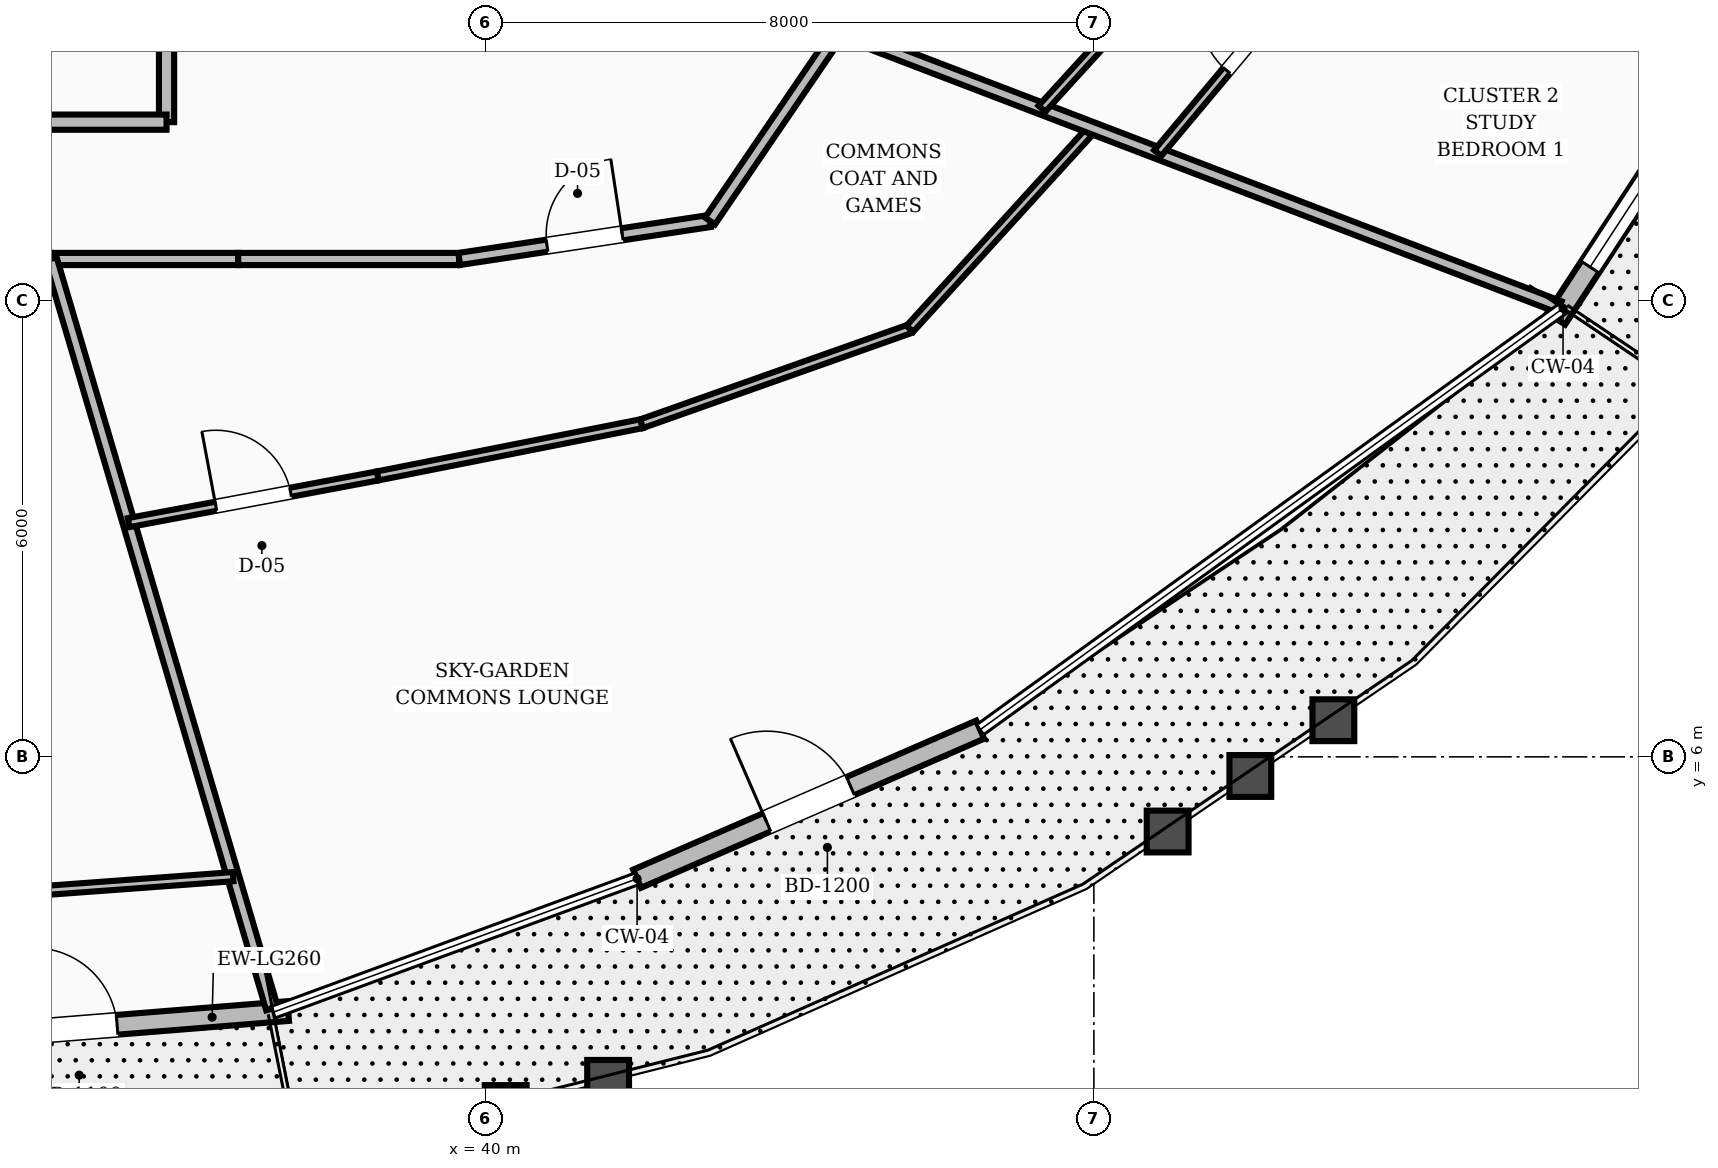
"""IFC4 building model, lengths in metres.
Left out: names, types, materials, properties, quantities, classifications, styles, units other than length and angle.
Written with IfcOpenShell. Run it as: python <this file> out.ifc"""

import sys

from ifc_helpers import new_model, si_unit, direction, frame, frame_2d, origin, place, context, subcontext, project, spatial, rectangle, extrude, element, fill, save


model = new_model("IFC4")
c1 = context("Model", 3, precision=1e-05, world=origin(), true_north=direction((0.0, 1.0)))
c2 = subcontext(c1, "Body", "Model", "MODEL_VIEW")
j1 = project(units=[si_unit("LENGTHUNIT", "METRE"), si_unit("PLANEANGLEUNIT", "RADIAN")], contexts=[c1])
p1 = place(None, origin())
s1 = spatial("IfcSite", under=j1, at=p1, CompositionType="ELEMENT")
p2 = place(p1, origin())
s2 = spatial("IfcBuilding", under=s1, at=p2, CompositionType="ELEMENT")
p3 = place(p2, frame((0.0, 0.0, 124.4)))
s3 = spatial("IfcBuildingStorey", under=s2, at=p3, CompositionType="ELEMENT", Elevation=124.4)
p4 = place(p3, frame((32.0, 2.221, 0.0), z_axis=(0.0, 0.0, 1.0), x_axis=(0.996781807787, 0.080162507846, 0.0)))
e1 = element("IfcWall", 1, at=p4, inside=s3, PredefinedType="STANDARD", context=c2, shape_type="SweptSolid", body=[
    extrude(rectangle(XDim=5.418, YDim=0.26, at=frame_2d((2.709, 0.0))), origin(), (0.0, 0.0, 1.0), 2.82),
])
p5 = place(p4, frame((2.06, 0.0, 0.0)))
e2 = element("IfcOpeningElement", 2, at=p5, cuts=e1, PredefinedType="OPENING", context=c2, shape_type="SweptSolid", body=[
    extrude(rectangle(XDim=1.1, YDim=2.15, at=frame_2d((0.55, 1.075))), frame((0.0, 0.14, 0.0), z_axis=(0.0, -1.0, 0.0), x_axis=(1.0, 0.0, 0.0)), (0.0, 0.0, 1.0), 0.28),
])
p6 = place(p3, frame((41.99, 4.396, 0.0), z_axis=(0.0, 0.0, 1.0), x_axis=(0.917175715583, 0.398483006846, 0.0)))
e3 = element("IfcWall", 3, at=p6, inside=s3, PredefinedType="STANDARD", context=c2, shape_type="SweptSolid", body=[
    extrude(rectangle(XDim=4.921, YDim=0.26, at=frame_2d((2.46, 0.0))), origin(), (0.0, 0.0, 1.0), 2.82),
])
p7 = place(p6, frame((1.861, 0.0, 0.0)))
e4 = element("IfcOpeningElement", 4, at=p7, cuts=e3, PredefinedType="OPENING", context=c2, shape_type="SweptSolid", body=[
    extrude(rectangle(XDim=1.2, YDim=2.15, at=frame_2d((0.6, 1.075))), frame((0.0, 0.14, 0.0), z_axis=(0.0, -1.0, 0.0), x_axis=(1.0, 0.0, 0.0)), (0.0, 0.0, 1.0), 0.28),
])
p8 = place(p3, frame((54.083, 11.763, 0.0), z_axis=(0.0, 0.0, 1.0), x_axis=(0.54762586096, 0.8367233213, 0.0)))
e5 = element("IfcWall", 5, at=p8, inside=s3, PredefinedType="STANDARD", context=c2, shape_type="SweptSolid", body=[
    extrude(rectangle(XDim=4.664, YDim=0.28, at=frame_2d((2.332, 0.0))), origin(), (0.0, 0.0, 1.0), 2.82),
])
p9 = place(p8, frame((0.814, 0.0, 0.8)))
e6 = element("IfcOpeningElement", 6, at=p9, cuts=e5, PredefinedType="OPENING", context=c2, shape_type="SweptSolid", body=[
    extrude(rectangle(XDim=3.2, YDim=1.65, at=frame_2d((1.6, 0.825))), frame((0.0, 0.15, 0.0), z_axis=(0.0, -1.0, 0.0), x_axis=(1.0, 0.0, 0.0)), (0.0, 0.0, 1.0), 0.3),
])
p10 = place(p3, frame((35.8, 14.35, 0.0), z_axis=(0.0, 0.0, 1.0), x_axis=(0.0, 1.0, 0.0)))
e7 = element("IfcWall", 7, at=p10, inside=s3, PredefinedType="SOLIDWALL", context=c2, shape_type="SweptSolid", body=[
    extrude(rectangle(XDim=2.2, YDim=0.2, at=frame_2d((1.1, 0.0))), origin(), (0.0, 0.0, 1.0), 2.8),
])
p11 = place(p3, frame((28.2, 14.35, 0.0), z_axis=(0.0, 0.0, 1.0), x_axis=(1.0, 0.0, 0.0)))
e8 = element("IfcWall", 8, at=p11, inside=s3, PredefinedType="SOLIDWALL", context=c2, shape_type="SweptSolid", body=[
    extrude(rectangle(XDim=7.6, YDim=0.2, at=frame_2d((3.8, 0.0))), origin(), (0.0, 0.0, 1.0), 2.8),
])
p12 = place(p11, frame((3.2, 0.0, 0.0)))
e9 = element("IfcOpeningElement", 9, at=p12, cuts=e8, PredefinedType="OPENING", context=c2, shape_type="SweptSolid", body=[
    extrude(rectangle(XDim=1.2, YDim=2.1, at=frame_2d((0.6, 1.05))), frame((0.0, 0.11, 0.0), z_axis=(0.0, -1.0, 0.0), x_axis=(1.0, 0.0, 0.0)), (0.0, 0.0, 1.0), 0.22),
])
p13 = place(p3, frame((34.278, 12.55, 0.0), z_axis=(0.0, 0.0, 1.0), x_axis=(1.0, 0.0, 0.0)))
e10 = element("IfcWall", 10, at=p13, inside=s3, PredefinedType="SOLIDWALL", context=c2, shape_type="SweptSolid", body=[
    extrude(rectangle(XDim=2.465, YDim=0.16, at=frame_2d((1.232, 0.0))), origin(), (0.0, 0.0, 1.0), 2.8),
])
p14 = place(p3, frame((36.743, 12.55, 0.0), z_axis=(0.0, 0.0, 1.0), x_axis=(1.0, 0.0, 0.0)))
e11 = element("IfcWall", 11, at=p14, inside=s3, PredefinedType="SOLIDWALL", context=c2, shape_type="SweptSolid", body=[
    extrude(rectangle(XDim=2.908, YDim=0.16, at=frame_2d((1.454, 0.0))), origin(), (0.0, 0.0, 1.0), 2.8),
])
p15 = place(p3, frame((39.651, 12.55, 0.0), z_axis=(0.0, 0.0, 1.0), x_axis=(0.988710906508, 0.149835721217, 0.0)))
e12 = element("IfcWall", 12, at=p15, inside=s3, PredefinedType="SOLIDWALL", context=c2, shape_type="SweptSolid", body=[
    extrude(rectangle(XDim=3.337, YDim=0.16, at=frame_2d((1.668, 0.0))), origin(), (0.0, 0.0, 1.0), 2.8),
])
p16 = place(p15, frame((1.168, 0.0, 0.0)))
e13 = element("IfcOpeningElement", 13, at=p16, cuts=e12, PredefinedType="OPENING", context=c2, shape_type="SweptSolid", body=[
    extrude(rectangle(XDim=1.0, YDim=2.1, at=frame_2d((0.5, 1.05))), frame((0.0, 0.09, 0.0), z_axis=(0.0, -1.0, 0.0), x_axis=(1.0, 0.0, 0.0)), (0.0, 0.0, 1.0), 0.18),
])
p17 = place(p3, frame((42.95, 13.05, 0.0), z_axis=(0.0, 0.0, 1.0), x_axis=(0.562674669208, 0.826678423955, 0.0)))
e14 = element("IfcWall", 14, at=p17, inside=s3, PredefinedType="SOLIDWALL", context=c2, shape_type="SweptSolid", body=[
    extrude(rectangle(XDim=3.021, YDim=0.16, at=frame_2d((1.511, 0.0))), origin(), (0.0, 0.0, 1.0), 2.8),
])
p18 = place(p3, frame((34.278, 12.55, 0.0), z_axis=(0.0, 0.0, 1.0), x_axis=(0.283064731291, -0.959100806954, 0.0)))
e15 = element("IfcWall", 15, at=p18, inside=s3, PredefinedType="SOLIDWALL", context=c2, shape_type="SweptSolid", body=[
    extrude(rectangle(XDim=10.283, YDim=0.16, at=frame_2d((5.141, 0.0))), origin(), (0.0, 0.0, 1.0), 2.8),
])
p19 = place(p3, frame((35.301, 9.082, 0.0), z_axis=(0.0, 0.0, 1.0), x_axis=(0.982868872263, 0.184306212419, 0.0)))
e16 = element("IfcWall", 16, at=p19, inside=s3, PredefinedType="PARTITIONING", context=c2, shape_type="SweptSolid", body=[
    extrude(rectangle(XDim=3.335, YDim=0.12, at=frame_2d((1.668, 0.0))), origin(), (0.0, 0.0, 1.0), 2.8),
])
p20 = place(p19, frame((1.168, 0.0, 0.0)))
e17 = element("IfcOpeningElement", 17, at=p20, cuts=e16, PredefinedType="OPENING", context=c2, shape_type="SweptSolid", body=[
    extrude(rectangle(XDim=1.0, YDim=2.1, at=frame_2d((0.5, 1.05))), frame((0.0, 0.07, 0.0), z_axis=(0.0, -1.0, 0.0), x_axis=(1.0, 0.0, 0.0)), (0.0, 0.0, 1.0), 0.14),
])
p21 = place(p3, frame((38.58, 9.696, 0.0), z_axis=(0.0, 0.0, 1.0), x_axis=(0.980995270945, 0.19403164274, 0.0)))
e18 = element("IfcWall", 18, at=p21, inside=s3, PredefinedType="PARTITIONING", context=c2, shape_type="SweptSolid", body=[
    extrude(rectangle(XDim=3.537, YDim=0.12, at=frame_2d((1.769, 0.0))), origin(), (0.0, 0.0, 1.0), 2.8),
])
p22 = place(p3, frame((42.049, 10.383, 0.0), z_axis=(0.0, 0.0, 1.0), x_axis=(0.942746880335, 0.333509099753, 0.0)))
e19 = element("IfcWall", 19, at=p22, inside=s3, PredefinedType="PARTITIONING", context=c2, shape_type="SweptSolid", body=[
    extrude(rectangle(XDim=3.744, YDim=0.12, at=frame_2d((1.872, 0.0))), origin(), (0.0, 0.0, 1.0), 2.8),
])
p23 = place(p3, frame((45.579, 11.631, 0.0), z_axis=(0.0, 0.0, 1.0), x_axis=(0.673346353961, 0.739327185762, 0.0)))
e20 = element("IfcWall", 20, at=p23, inside=s3, PredefinedType="PARTITIONING", context=c2, shape_type="SweptSolid", body=[
    extrude(rectangle(XDim=3.571, YDim=0.12, at=frame_2d((1.785, 0.0))), origin(), (0.0, 0.0, 1.0), 2.8),
])
p24 = place(p3, frame((44.65, 15.548, 0.0), z_axis=(0.0, 0.0, 1.0), x_axis=(0.933853161124, -0.35765664185, 0.0)))
e21 = element("IfcWall", 21, at=p24, inside=s3, PredefinedType="SOLIDWALL", context=c2, shape_type="SweptSolid", body=[
    extrude(rectangle(XDim=10.147, YDim=0.16, at=frame_2d((5.073, 0.0))), origin(), (0.0, 0.0, 1.0), 2.8),
])
p25 = place(p3, frame((47.316, 14.526, 0.0), z_axis=(0.0, 0.0, 1.0), x_axis=(0.673803025367, 0.738911011562, 0.0)))
e22 = element("IfcWall", 22, at=p25, inside=s3, PredefinedType="PARTITIONING", context=c2, shape_type="SweptSolid", body=[
    extrude(rectangle(XDim=3.589, YDim=0.12, at=frame_2d((1.794, 0.0))), origin(), (0.0, 0.0, 1.0), 2.8),
])
p26 = place(p3, frame((48.84, 13.943, 0.0), z_axis=(0.0, 0.0, 1.0), x_axis=(0.64212553746, 0.766599500483, 0.0)))
e23 = element("IfcWall", 23, at=p26, inside=s3, PredefinedType="PARTITIONING", context=c2, shape_type="SweptSolid", body=[
    extrude(rectangle(XDim=3.781, YDim=0.12, at=frame_2d((1.891, 0.0))), origin(), (0.0, 0.0, 1.0), 2.8),
])
p27 = place(p26, frame((1.416, 0.0, 0.0)))
e24 = element("IfcOpeningElement", 24, at=p27, cuts=e23, PredefinedType="OPENING", context=c2, shape_type="SweptSolid", body=[
    extrude(rectangle(XDim=0.95, YDim=2.1, at=frame_2d((0.475, 1.05))), frame((0.0, 0.07, 0.0), z_axis=(0.0, -1.0, 0.0), x_axis=(1.0, 0.0, 0.0)), (0.0, 0.0, 1.0), 0.14),
])
p28 = place(p3, frame((32.0, 4.081, 0.0), z_axis=(0.0, 0.0, 1.0), x_axis=(0.997319932427, 0.073163873489, 0.0)))
e25 = element("IfcWall", 25, at=p28, inside=s3, PredefinedType="PARTITIONING", context=c2, shape_type="SweptSolid", body=[
    extrude(rectangle(XDim=4.688, YDim=0.12, at=frame_2d((2.344, 0.0))), origin(), (0.0, 0.0, 1.0), 2.8),
])
p29 = place(p5, origin())
e26 = element("IfcDoor", 26, at=p29, inside=s3, OperationType="SINGLE_SWING_LEFT", PredefinedType="DOOR", context=c2, shape_type="SweptSolid", body=[
    extrude(rectangle(XDim=1.1, YDim=2.15, at=frame_2d((0.55, 1.075))), frame((0.0, 0.025, 0.0), z_axis=(0.0, -1.0, 0.0), x_axis=(1.0, 0.0, 0.0)), (0.0, 0.0, 1.0), 0.05),
])
fill(e2, e26)
p30 = place(p7, origin())
e27 = element("IfcDoor", 27, at=p30, inside=s3, OperationType="SINGLE_SWING_LEFT", PredefinedType="DOOR", context=c2, shape_type="SweptSolid", body=[
    extrude(rectangle(XDim=1.2, YDim=2.15, at=frame_2d((0.6, 1.075))), frame((0.0, 0.025, 0.0), z_axis=(0.0, -1.0, 0.0), x_axis=(1.0, 0.0, 0.0)), (0.0, 0.0, 1.0), 0.05),
])
fill(e4, e27)
p31 = place(p9, origin())
e28 = element("IfcWindow", 28, at=p31, inside=s3, PartitioningType="SINGLE_PANEL", PredefinedType="WINDOW", context=c2, shape_type="SweptSolid", body=[
    extrude(rectangle(XDim=3.2, YDim=1.65, at=frame_2d((1.6, 0.825))), frame((0.0, 0.03, 0.0), z_axis=(0.0, -1.0, 0.0), x_axis=(1.0, 0.0, 0.0)), (0.0, 0.0, 1.0), 0.06),
])
fill(e6, e28)
p32 = place(p16, origin())
e29 = element("IfcDoor", 29, at=p32, inside=s3, OperationType="SINGLE_SWING_RIGHT", PredefinedType="DOOR", context=c2, shape_type="SweptSolid", body=[
    extrude(rectangle(XDim=1.0, YDim=2.1, at=frame_2d((0.5, 1.05))), frame((0.0, 0.025, 0.0), z_axis=(0.0, -1.0, 0.0), x_axis=(1.0, 0.0, 0.0)), (0.0, 0.0, 1.0), 0.05),
])
fill(e13, e29)
p33 = place(p20, origin())
e30 = element("IfcDoor", 30, at=p33, inside=s3, OperationType="SINGLE_SWING_LEFT", PredefinedType="DOOR", context=c2, shape_type="SweptSolid", body=[
    extrude(rectangle(XDim=1.0, YDim=2.1, at=frame_2d((0.5, 1.05))), frame((0.0, 0.025, 0.0), z_axis=(0.0, -1.0, 0.0), x_axis=(1.0, 0.0, 0.0)), (0.0, 0.0, 1.0), 0.05),
])
fill(e17, e30)
p34 = place(p27, origin())
e31 = element("IfcDoor", 31, at=p34, inside=s3, OperationType="SINGLE_SWING_RIGHT", PredefinedType="DOOR", context=c2, shape_type="SweptSolid", body=[
    extrude(rectangle(XDim=0.95, YDim=2.1, at=frame_2d((0.475, 1.05))), frame((0.0, 0.025, 0.0), z_axis=(0.0, -1.0, 0.0), x_axis=(1.0, 0.0, 0.0)), (0.0, 0.0, 1.0), 0.05),
])
fill(e24, e31)
save(model, sys.argv[1])
